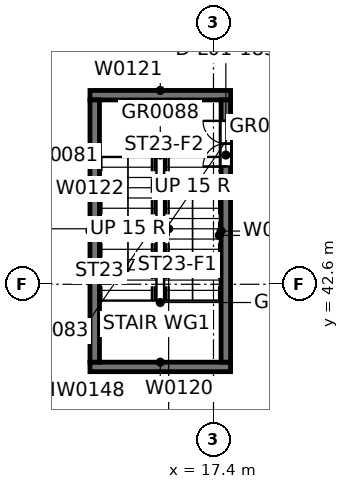
"""IFC4 building model, lengths in metres.
Left out: names, types, materials, properties, quantities, classifications, styles, units other than length and angle.
Written with IfcOpenShell. Run it as: python <this file> out.ifc"""

import sys

from ifc_helpers import new_model, si_unit, direction, frame, frame_2d, origin, place, context, subcontext, project, spatial, rectangle, extrude, element, fill, save


model = new_model("IFC4")
c1 = context("Model", 3, precision=1e-05, world=origin(), true_north=direction((0.0, 1.0)))
c2 = subcontext(c1, "Body", "Model", "MODEL_VIEW")
j1 = project(units=[si_unit("LENGTHUNIT", "METRE"), si_unit("PLANEANGLEUNIT", "RADIAN")], contexts=[c1])
p1 = place(None, origin())
s1 = spatial("IfcSite", under=j1, at=p1, CompositionType="ELEMENT")
p2 = place(p1, origin())
s2 = spatial("IfcBuilding", under=s1, at=p2, CompositionType="ELEMENT")
p3 = place(p2, frame((0.0, 0.0, 4.8)))
s3 = spatial("IfcBuildingStorey", under=s2, at=p3, CompositionType="ELEMENT", Elevation=4.8)
for number, where, z_axis, x_axis in (
    (1, (14.15, 40.425, 0.0), (0.0, 0.0, 1.0), (1.0, 0.0, 0.0)),
    (2, (14.15, 47.575, 0.0), (0.0, 0.0, 1.0), (1.0, 0.0, 0.0)),
):
    element("IfcWall", number, at=place(p3, frame(where, z_axis=z_axis, x_axis=x_axis)), inside=s3, PredefinedType="SOLIDWALL", context=c2, shape_type="SweptSolid", body=[
        extrude(rectangle(XDim=3.7, YDim=0.25, at=frame_2d((1.85, 0.0))), origin(), (0.0, 0.0, 1.0), 4.8),
    ])
p4 = place(p3, frame((14.275, 40.55, 0.0), z_axis=(0.0, 0.0, 1.0), x_axis=(0.0, 1.0, 0.0)))
e3 = element("IfcWall", 3, at=p4, inside=s3, PredefinedType="SOLIDWALL", context=c2, shape_type="SweptSolid", body=[
    extrude(rectangle(XDim=6.9, YDim=0.25, at=frame_2d((3.45, 0.0))), origin(), (0.0, 0.0, 1.0), 4.8),
])
p5 = place(p3, frame((17.725, 40.55, 0.0), z_axis=(0.0, 0.0, 1.0), x_axis=(0.0, 1.0, 0.0)))
e4 = element("IfcWall", 4, at=p5, inside=s3, PredefinedType="SOLIDWALL", context=c2, shape_type="SweptSolid", body=[
    extrude(rectangle(XDim=6.9, YDim=0.25, at=frame_2d((3.45, 0.0))), origin(), (0.0, 0.0, 1.0), 4.8),
])
p6 = place(p5, frame((5.15, 0.0, 0.0)))
e5 = element("IfcOpeningElement", 5, at=p6, cuts=e4, PredefinedType="OPENING", context=c2, shape_type="SweptSolid", body=[
    extrude(rectangle(XDim=1.2, YDim=2.1, at=frame_2d((0.6, 1.05))), frame((0.0, 0.135, 0.0), z_axis=(0.0, -1.0, 0.0), x_axis=(1.0, 0.0, 0.0)), (0.0, 0.0, 1.0), 0.27),
])
p7 = place(p6, origin())
e6 = element("IfcDoor", 6, at=p7, inside=s3, OperationType="DOUBLE_DOOR_SINGLE_SWING", PredefinedType="DOOR", context=c2, shape_type="SweptSolid", body=[
    extrude(rectangle(XDim=1.2, YDim=2.1, at=frame_2d((0.6, 1.05))), frame((0.0, 0.025, 0.0), z_axis=(0.0, -1.0, 0.0), x_axis=(1.0, 0.0, 0.0)), (0.0, 0.0, 1.0), 0.05),
])
fill(e5, e6)
save(model, sys.argv[1])
